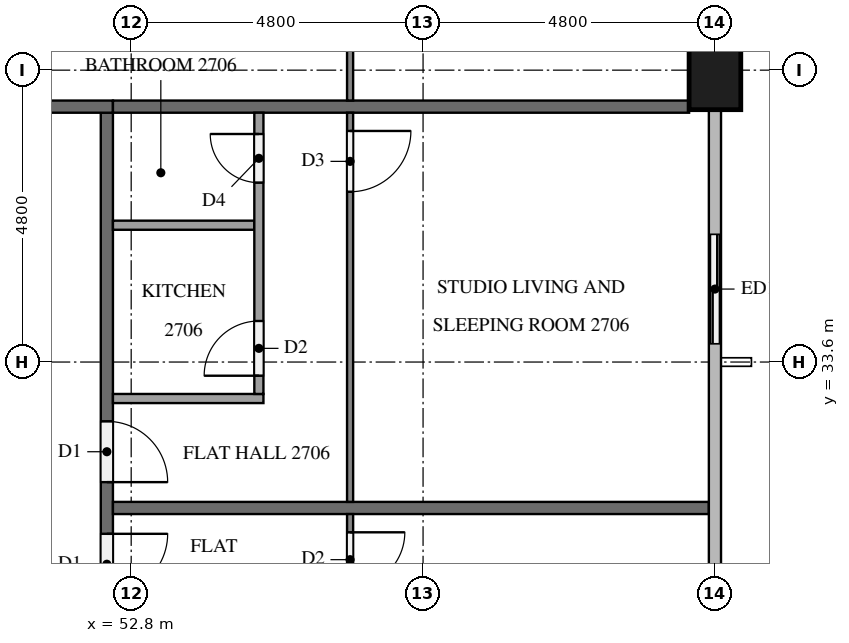
"""IFC4 building model, lengths in metres.
Left out: names, types, materials, properties, quantities, classifications, styles, units other than length and angle.
Written with IfcOpenShell. Run it as: python <this file> out.ifc"""

import sys

from ifc_helpers import new_model, si_unit, direction, frame, frame_2d, origin, origin_2d, place, context, subcontext, project, spatial, rectangle, extrude, element, fill, save


model = new_model("IFC4")
c1 = context("Model", 3, precision=1e-05, world=origin(), true_north=direction((0.0, 1.0)))
c2 = subcontext(c1, "Body", "Model", "MODEL_VIEW")
j1 = project(units=[si_unit("LENGTHUNIT", "METRE"), si_unit("PLANEANGLEUNIT", "RADIAN")], contexts=[c1])
p1 = place(None, origin())
s1 = spatial("IfcSite", under=j1, at=p1, CompositionType="ELEMENT")
p2 = place(p1, origin())
s2 = spatial("IfcBuilding", under=s1, at=p2, CompositionType="ELEMENT")
p3 = place(p2, frame((0.0, 0.0, 106.7)))
s3 = spatial("IfcBuildingStorey", under=s2, at=p3, CompositionType="ELEMENT", Elevation=106.7)
p4 = place(p3, frame((62.4, 38.4, 0.0), z_axis=(0.0, 0.0, 1.0), x_axis=(0.0, 1.0, 0.0)))
e1 = element("IfcColumn", 1, at=p4, inside=s3, PredefinedType="COLUMN", context=c2, shape_type="SweptSolid", body=[
    extrude(rectangle(XDim=1.3, YDim=0.85, at=origin_2d()), origin(), (0.0, 0.0, 1.0), 3.2),
])
p5 = place(p3, frame((62.4, 33.6, 0.0), z_axis=(0.0, 0.0, 1.0), x_axis=(0.0, 1.0, 0.0)))
e2 = element("IfcWall", 2, at=p5, inside=s3, PredefinedType="SOLIDWALL", context=c2, shape_type="SweptSolid", body=[
    extrude(rectangle(XDim=2.4, YDim=0.15, at=frame_2d((1.2, 0.0))), origin(), (0.0, 0.0, 1.0), 3.2),
])
p6 = place(p5, frame((0.3, 0.0, 0.0)))
e3 = element("IfcOpeningElement", 3, at=p6, cuts=e2, PredefinedType="OPENING", context=c2, shape_type="SweptSolid", body=[
    extrude(rectangle(XDim=1.8, YDim=2.4, at=frame_2d((0.9, 1.2))), frame((0.0, 0.085, 0.0), z_axis=(0.0, -1.0, 0.0), x_axis=(1.0, 0.0, 0.0)), (0.0, 0.0, 1.0), 0.17),
])
p7 = place(p3, frame((52.4, 37.7, 0.0), z_axis=(0.0, 0.0, 1.0), x_axis=(0.0, -1.0, 0.0)))
e4 = element("IfcWall", 4, at=p7, inside=s3, PredefinedType="PARTITIONING", context=c2, shape_type="SweptSolid", body=[
    extrude(rectangle(XDim=22.6, YDim=0.2, at=frame_2d((11.3, 0.0))), origin(), (0.0, 0.0, 1.0), 3.2),
])
p8 = place(p7, frame((6.925, 0.0, 0.0)))
e5 = element("IfcOpeningElement", 5, at=p8, cuts=e4, PredefinedType="OPENING", context=c2, shape_type="SweptSolid", body=[
    extrude(rectangle(XDim=1.0, YDim=2.1, at=frame_2d((0.5, 1.05))), frame((0.0, 0.11, 0.0), z_axis=(0.0, -1.0, 0.0), x_axis=(1.0, 0.0, 0.0)), (0.0, 0.0, 1.0), 0.22),
])
p9 = place(p7, frame((5.075, 0.0, 0.0)))
e6 = element("IfcOpeningElement", 6, at=p9, cuts=e4, PredefinedType="OPENING", context=c2, shape_type="SweptSolid", body=[
    extrude(rectangle(XDim=1.0, YDim=2.1, at=frame_2d((0.5, 1.05))), frame((0.0, 0.11, 0.0), z_axis=(0.0, -1.0, 0.0), x_axis=(1.0, 0.0, 0.0)), (0.0, 0.0, 1.0), 0.22),
])
p10 = place(p3, frame((52.5, 37.8, 0.0), z_axis=(0.0, 0.0, 1.0), x_axis=(-1.0, 0.0, 0.0)))
e7 = element("IfcWall", 7, at=p10, inside=s3, PredefinedType="PARTITIONING", context=c2, shape_type="SweptSolid", body=[
    extrude(rectangle(XDim=2.2, YDim=0.2, at=frame_2d((1.1, 0.0))), origin(), (0.0, 0.0, 1.0), 3.2),
])
p11 = place(p3, frame((52.5, 31.2, 0.0), z_axis=(0.0, 0.0, 1.0), x_axis=(1.0, 0.0, 0.0)))
e8 = element("IfcWall", 8, at=p11, inside=s3, PredefinedType="PARTITIONING", context=c2, shape_type="SweptSolid", body=[
    extrude(rectangle(XDim=9.8, YDim=0.2, at=frame_2d((4.9, 0.0))), origin(), (0.0, 0.0, 1.0), 3.2),
])
p12 = place(p3, frame((52.5, 37.8, 0.0), z_axis=(0.0, 0.0, 1.0), x_axis=(1.0, 0.0, 0.0)))
e9 = element("IfcWall", 9, at=p12, inside=s3, PredefinedType="PARTITIONING", context=c2, shape_type="SweptSolid", body=[
    extrude(rectangle(XDim=9.475, YDim=0.2, at=frame_2d((4.738, 0.0))), origin(), (0.0, 0.0, 1.0), 3.2),
])
p13 = place(p3, frame((56.4, 31.1, 0.0), z_axis=(0.0, 0.0, 1.0), x_axis=(0.0, -1.0, 0.0)))
e10 = element("IfcWall", 10, at=p13, inside=s3, PredefinedType="PARTITIONING", context=c2, shape_type="SweptSolid", body=[
    extrude(rectangle(XDim=16.0, YDim=0.1, at=frame_2d((8.0, 0.0))), origin(), (0.0, 0.0, 1.0), 3.2),
])
p14 = place(p13, frame((0.3, 0.0, 0.0)))
e11 = element("IfcOpeningElement", 11, at=p14, cuts=e10, PredefinedType="OPENING", context=c2, shape_type="SweptSolid", body=[
    extrude(rectangle(XDim=0.9, YDim=2.1, at=frame_2d((0.45, 1.05))), frame((0.0, 0.06, 0.0), z_axis=(0.0, -1.0, 0.0), x_axis=(1.0, 0.0, 0.0)), (0.0, 0.0, 1.0), 0.12),
])
p15 = place(p13, frame((8.25, 0.0, 0.0)))
e12 = element("IfcOpeningElement", 12, at=p15, cuts=e10, PredefinedType="OPENING", context=c2, shape_type="SweptSolid", body=[
    extrude(rectangle(XDim=0.9, YDim=2.1, at=frame_2d((0.45, 1.05))), frame((0.0, 0.06, 0.0), z_axis=(0.0, -1.0, 0.0), x_axis=(1.0, 0.0, 0.0)), (0.0, 0.0, 1.0), 0.12),
])
p16 = place(p13, frame((9.85, 0.0, 0.0)))
e13 = element("IfcOpeningElement", 13, at=p16, cuts=e10, PredefinedType="OPENING", context=c2, shape_type="SweptSolid", body=[
    extrude(rectangle(XDim=1.0, YDim=2.1, at=frame_2d((0.5, 1.05))), frame((0.0, 0.06, 0.0), z_axis=(0.0, -1.0, 0.0), x_axis=(1.0, 0.0, 0.0)), (0.0, 0.0, 1.0), 0.12),
])
p17 = place(p3, frame((56.4, 37.7, 0.0), z_axis=(0.0, 0.0, 1.0), x_axis=(0.0, -1.0, 0.0)))
e14 = element("IfcWall", 14, at=p17, inside=s3, PredefinedType="PARTITIONING", context=c2, shape_type="SweptSolid", body=[
    extrude(rectangle(XDim=6.4, YDim=0.1, at=frame_2d((3.2, 0.0))), origin(), (0.0, 0.0, 1.0), 3.2),
])
p18 = place(p17, frame((0.3, 0.0, 0.0)))
e15 = element("IfcOpeningElement", 15, at=p18, cuts=e14, PredefinedType="OPENING", context=c2, shape_type="SweptSolid", body=[
    extrude(rectangle(XDim=1.0, YDim=2.1, at=frame_2d((0.5, 1.05))), frame((0.0, 0.06, 0.0), z_axis=(0.0, -1.0, 0.0), x_axis=(1.0, 0.0, 0.0)), (0.0, 0.0, 1.0), 0.12),
])
p19 = place(p3, frame((52.5, 35.85, 0.0), z_axis=(0.0, 0.0, 1.0), x_axis=(1.0, 0.0, 0.0)))
e16 = element("IfcWall", 16, at=p19, inside=s3, PredefinedType="PARTITIONING", context=c2, shape_type="SweptSolid", body=[
    extrude(rectangle(XDim=2.325, YDim=0.15, at=frame_2d((1.163, 0.0))), origin(), (0.0, 0.0, 1.0), 3.2),
])
p20 = place(p3, frame((52.5, 33.0, 0.0), z_axis=(0.0, 0.0, 1.0), x_axis=(1.0, 0.0, 0.0)))
e17 = element("IfcWall", 17, at=p20, inside=s3, PredefinedType="PARTITIONING", context=c2, shape_type="SweptSolid", body=[
    extrude(rectangle(XDim=2.475, YDim=0.15, at=frame_2d((1.238, 0.0))), origin(), (0.0, 0.0, 1.0), 3.2),
])
p21 = place(p3, frame((54.9, 33.075, 0.0), z_axis=(0.0, 0.0, 1.0), x_axis=(0.0, 1.0, 0.0)))
e18 = element("IfcWall", 18, at=p21, inside=s3, PredefinedType="PARTITIONING", context=c2, shape_type="SweptSolid", body=[
    extrude(rectangle(XDim=4.625, YDim=0.15, at=frame_2d((2.312, 0.0))), origin(), (0.0, 0.0, 1.0), 3.2),
])
p22 = place(p21, frame((0.3, 0.0, 0.0)))
e19 = element("IfcOpeningElement", 19, at=p22, cuts=e18, PredefinedType="OPENING", context=c2, shape_type="SweptSolid", body=[
    extrude(rectangle(XDim=0.9, YDim=2.1, at=frame_2d((0.45, 1.05))), frame((0.0, 0.085, 0.0), z_axis=(0.0, -1.0, 0.0), x_axis=(1.0, 0.0, 0.0)), (0.0, 0.0, 1.0), 0.17),
])
p23 = place(p21, frame((3.475, 0.0, 0.0)))
e20 = element("IfcOpeningElement", 20, at=p23, cuts=e18, PredefinedType="OPENING", context=c2, shape_type="SweptSolid", body=[
    extrude(rectangle(XDim=0.8, YDim=2.1, at=frame_2d((0.4, 1.05))), frame((0.0, 0.085, 0.0), z_axis=(0.0, -1.0, 0.0), x_axis=(1.0, 0.0, 0.0)), (0.0, 0.0, 1.0), 0.17),
])
p24 = place(p3, frame((56.4, 52.7, 0.0), z_axis=(0.0, 0.0, 1.0), x_axis=(0.0, -1.0, 0.0)))
e21 = element("IfcWall", 21, at=p24, inside=s3, PredefinedType="PARTITIONING", context=c2, shape_type="SweptSolid", body=[
    extrude(rectangle(XDim=14.8, YDim=0.1, at=frame_2d((7.4, 0.0))), origin(), (0.0, 0.0, 1.0), 3.2),
])
p25 = place(p24, frame((9.85, 0.0, 0.0)))
e22 = element("IfcOpeningElement", 22, at=p25, cuts=e21, PredefinedType="OPENING", context=c2, shape_type="SweptSolid", body=[
    extrude(rectangle(XDim=0.9, YDim=2.1, at=frame_2d((0.45, 1.05))), frame((0.0, 0.06, 0.0), z_axis=(0.0, -1.0, 0.0), x_axis=(1.0, 0.0, 0.0)), (0.0, 0.0, 1.0), 0.12),
])
p26 = place(p24, frame((8.15, 0.0, 0.0)))
e23 = element("IfcOpeningElement", 23, at=p26, cuts=e21, PredefinedType="OPENING", context=c2, shape_type="SweptSolid", body=[
    extrude(rectangle(XDim=1.0, YDim=2.1, at=frame_2d((0.5, 1.05))), frame((0.0, 0.06, 0.0), z_axis=(0.0, -1.0, 0.0), x_axis=(1.0, 0.0, 0.0)), (0.0, 0.0, 1.0), 0.12),
])
p27 = place(p24, frame((0.5, 0.0, 0.0)))
e24 = element("IfcOpeningElement", 24, at=p27, cuts=e21, PredefinedType="OPENING", context=c2, shape_type="SweptSolid", body=[
    extrude(rectangle(XDim=0.9, YDim=2.1, at=frame_2d((0.45, 1.05))), frame((0.0, 0.06, 0.0), z_axis=(0.0, -1.0, 0.0), x_axis=(1.0, 0.0, 0.0)), (0.0, 0.0, 1.0), 0.12),
])
p28 = place(p6, origin())
e25 = element("IfcDoor", 25, at=p28, inside=s3, OperationType="SLIDING_TO_RIGHT", PredefinedType="DOOR", context=c2, shape_type="SweptSolid", body=[
    extrude(rectangle(XDim=1.8, YDim=2.4, at=frame_2d((0.9, 1.2))), frame((0.0, 0.025, 0.0), z_axis=(0.0, -1.0, 0.0), x_axis=(1.0, 0.0, 0.0)), (0.0, 0.0, 1.0), 0.05),
])
fill(e3, e25)
p29 = place(p8, origin())
e26 = element("IfcDoor", 26, at=p29, inside=s3, OperationType="SINGLE_SWING_LEFT", PredefinedType="DOOR", context=c2, shape_type="SweptSolid", body=[
    extrude(rectangle(XDim=1.0, YDim=2.1, at=frame_2d((0.5, 1.05))), frame((0.0, 0.025, 0.0), z_axis=(0.0, -1.0, 0.0), x_axis=(1.0, 0.0, 0.0)), (0.0, 0.0, 1.0), 0.05),
])
fill(e5, e26)
p30 = place(p9, origin())
e27 = element("IfcDoor", 27, at=p30, inside=s3, OperationType="SINGLE_SWING_RIGHT", PredefinedType="DOOR", context=c2, shape_type="SweptSolid", body=[
    extrude(rectangle(XDim=1.0, YDim=2.1, at=frame_2d((0.5, 1.05))), frame((0.0, 0.025, 0.0), z_axis=(0.0, -1.0, 0.0), x_axis=(1.0, 0.0, 0.0)), (0.0, 0.0, 1.0), 0.05),
])
fill(e6, e27)
p31 = place(p14, origin())
e28 = element("IfcDoor", 28, at=p31, inside=s3, OperationType="SINGLE_SWING_LEFT", PredefinedType="DOOR", context=c2, shape_type="SweptSolid", body=[
    extrude(rectangle(XDim=0.9, YDim=2.1, at=frame_2d((0.45, 1.05))), frame((0.0, 0.025, 0.0), z_axis=(0.0, -1.0, 0.0), x_axis=(1.0, 0.0, 0.0)), (0.0, 0.0, 1.0), 0.05),
])
fill(e11, e28)
p32 = place(p18, origin())
e29 = element("IfcDoor", 29, at=p32, inside=s3, OperationType="SINGLE_SWING_LEFT", PredefinedType="DOOR", context=c2, shape_type="SweptSolid", body=[
    extrude(rectangle(XDim=1.0, YDim=2.1, at=frame_2d((0.5, 1.05))), frame((0.0, 0.025, 0.0), z_axis=(0.0, -1.0, 0.0), x_axis=(1.0, 0.0, 0.0)), (0.0, 0.0, 1.0), 0.05),
])
fill(e15, e29)
p33 = place(p22, origin())
e30 = element("IfcDoor", 30, at=p33, inside=s3, OperationType="SINGLE_SWING_LEFT", PredefinedType="DOOR", context=c2, shape_type="SweptSolid", body=[
    extrude(rectangle(XDim=0.9, YDim=2.1, at=frame_2d((0.45, 1.05))), frame((0.0, 0.025, 0.0), z_axis=(0.0, -1.0, 0.0), x_axis=(1.0, 0.0, 0.0)), (0.0, 0.0, 1.0), 0.05),
])
fill(e19, e30)
p34 = place(p23, origin())
e31 = element("IfcDoor", 31, at=p34, inside=s3, OperationType="SINGLE_SWING_RIGHT", PredefinedType="DOOR", context=c2, shape_type="SweptSolid", body=[
    extrude(rectangle(XDim=0.8, YDim=2.1, at=frame_2d((0.4, 1.05))), frame((0.0, 0.025, 0.0), z_axis=(0.0, -1.0, 0.0), x_axis=(1.0, 0.0, 0.0)), (0.0, 0.0, 1.0), 0.05),
])
fill(e20, e31)
save(model, sys.argv[1])
